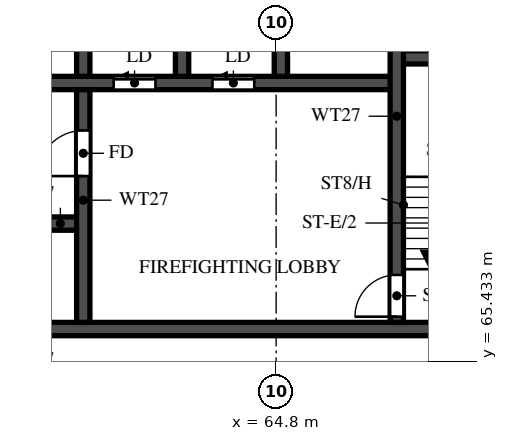
"""IFC4 building model, lengths in metres.
Left out: names, types, materials, properties, quantities, classifications, styles, units other than length and angle.
Written with IfcOpenShell. Run it as: python <this file> out.ifc"""

import sys

from ifc_helpers import new_model, si_unit, direction, frame, frame_2d, origin, place, context, subcontext, project, spatial, rectangle, extrude, element, fill, save


model = new_model("IFC4")
c1 = context("Model", 3, precision=1e-05, world=origin(), true_north=direction((0.0, 1.0)))
c2 = subcontext(c1, "Body", "Model", "MODEL_VIEW")
j1 = project(units=[si_unit("LENGTHUNIT", "METRE"), si_unit("PLANEANGLEUNIT", "RADIAN")], contexts=[c1])
p1 = place(None, origin())
s1 = spatial("IfcSite", under=j1, at=p1, CompositionType="ELEMENT")
p2 = place(p1, origin())
s2 = spatial("IfcBuilding", under=s1, at=p2, CompositionType="ELEMENT")
p3 = place(p2, frame((0.0, 0.0, 167.5)))
s3 = spatial("IfcBuildingStorey", under=s2, at=p3, CompositionType="ELEMENT", Elevation=167.5)
p4 = place(p3, frame((29.7, 66.275, 0.0), z_axis=(0.0, 0.0, 1.0), x_axis=(1.0, 0.0, 0.0)))
e1 = element("IfcWall", 1, at=p4, inside=s3, PredefinedType="SHEAR", context=c2, shape_type="SweptSolid", body=[
    extrude(rectangle(XDim=41.4, YDim=0.35, at=frame_2d((20.7, 0.0))), origin(), (0.0, 0.0, 1.0), 3.2),
])
p5 = place(p4, frame((0.925, 0.0, 0.0)))
e2 = element("IfcOpeningElement", 2, at=p5, cuts=e1, PredefinedType="OPENING", context=c2, shape_type="SweptSolid", body=[
    extrude(rectangle(XDim=1.1, YDim=2.1, at=frame_2d((0.55, 1.05))), frame((0.0, 0.185, 0.0), z_axis=(0.0, -1.0, 0.0), x_axis=(1.0, 0.0, 0.0)), (0.0, 0.0, 1.0), 0.37),
])
p6 = place(p4, frame((3.712, 0.0, 0.0)))
e3 = element("IfcOpeningElement", 3, at=p6, cuts=e1, PredefinedType="OPENING", context=c2, shape_type="SweptSolid", body=[
    extrude(rectangle(XDim=1.8, YDim=2.1, at=frame_2d((0.9, 1.05))), frame((0.0, 0.185, 0.0), z_axis=(0.0, -1.0, 0.0), x_axis=(1.0, 0.0, 0.0)), (0.0, 0.0, 1.0), 0.37),
])
p7 = place(p3, frame((35.625, 69.05, 0.0), z_axis=(0.0, 0.0, 1.0), x_axis=(1.0, 0.0, 0.0)))
e4 = element("IfcWall", 4, at=p7, inside=s3, PredefinedType="SHEAR", context=c2, shape_type="SweptSolid", body=[
    extrude(rectangle(XDim=24.1, YDim=0.35, at=frame_2d((12.05, 0.0))), origin(), (0.0, 0.0, 1.0), 3.2),
])
p8 = place(p7, frame((1.0, 0.0, 0.0)))
e5 = element("IfcOpeningElement", 5, at=p8, cuts=e4, PredefinedType="OPENING", context=c2, shape_type="SweptSolid", body=[
    extrude(rectangle(XDim=1.1, YDim=2.1, at=frame_2d((0.55, 1.05))), frame((0.0, 0.185, 0.0), z_axis=(0.0, -1.0, 0.0), x_axis=(1.0, 0.0, 0.0)), (0.0, 0.0, 1.0), 0.37),
])
p9 = place(p7, frame((3.75, 0.0, 0.0)))
e6 = element("IfcOpeningElement", 6, at=p9, cuts=e4, PredefinedType="OPENING", context=c2, shape_type="SweptSolid", body=[
    extrude(rectangle(XDim=1.1, YDim=2.1, at=frame_2d((0.55, 1.05))), frame((0.0, 0.185, 0.0), z_axis=(0.0, -1.0, 0.0), x_axis=(1.0, 0.0, 0.0)), (0.0, 0.0, 1.0), 0.37),
])
p10 = place(p7, frame((6.5, 0.0, 0.0)))
e7 = element("IfcOpeningElement", 7, at=p10, cuts=e4, PredefinedType="OPENING", context=c2, shape_type="SweptSolid", body=[
    extrude(rectangle(XDim=1.1, YDim=2.1, at=frame_2d((0.55, 1.05))), frame((0.0, 0.185, 0.0), z_axis=(0.0, -1.0, 0.0), x_axis=(1.0, 0.0, 0.0)), (0.0, 0.0, 1.0), 0.37),
])
p11 = place(p7, frame((9.25, 0.0, 0.0)))
e8 = element("IfcOpeningElement", 8, at=p11, cuts=e4, PredefinedType="OPENING", context=c2, shape_type="SweptSolid", body=[
    extrude(rectangle(XDim=1.1, YDim=2.1, at=frame_2d((0.55, 1.05))), frame((0.0, 0.185, 0.0), z_axis=(0.0, -1.0, 0.0), x_axis=(1.0, 0.0, 0.0)), (0.0, 0.0, 1.0), 0.37),
])
p12 = place(p7, frame((12.0, 0.0, 0.0)))
e9 = element("IfcOpeningElement", 9, at=p12, cuts=e4, PredefinedType="OPENING", context=c2, shape_type="SweptSolid", body=[
    extrude(rectangle(XDim=1.1, YDim=2.1, at=frame_2d((0.55, 1.05))), frame((0.0, 0.185, 0.0), z_axis=(0.0, -1.0, 0.0), x_axis=(1.0, 0.0, 0.0)), (0.0, 0.0, 1.0), 0.37),
])
p13 = place(p7, frame((14.75, 0.0, 0.0)))
e10 = element("IfcOpeningElement", 10, at=p13, cuts=e4, PredefinedType="OPENING", context=c2, shape_type="SweptSolid", body=[
    extrude(rectangle(XDim=1.1, YDim=2.1, at=frame_2d((0.55, 1.05))), frame((0.0, 0.185, 0.0), z_axis=(0.0, -1.0, 0.0), x_axis=(1.0, 0.0, 0.0)), (0.0, 0.0, 1.0), 0.37),
])
p14 = place(p7, frame((17.625, 0.0, 0.0)))
e11 = element("IfcOpeningElement", 11, at=p14, cuts=e4, PredefinedType="OPENING", context=c2, shape_type="SweptSolid", body=[
    extrude(rectangle(XDim=1.1, YDim=2.1, at=frame_2d((0.55, 1.05))), frame((0.0, 0.185, 0.0), z_axis=(0.0, -1.0, 0.0), x_axis=(1.0, 0.0, 0.0)), (0.0, 0.0, 1.0), 0.37),
])
p15 = place(p7, frame((20.625, 0.0, 0.0)))
e12 = element("IfcOpeningElement", 12, at=p15, cuts=e4, PredefinedType="OPENING", context=c2, shape_type="SweptSolid", body=[
    extrude(rectangle(XDim=1.1, YDim=2.1, at=frame_2d((0.55, 1.05))), frame((0.0, 0.185, 0.0), z_axis=(0.0, -1.0, 0.0), x_axis=(1.0, 0.0, 0.0)), (0.0, 0.0, 1.0), 0.37),
])
p16 = place(p3, frame((32.825, 72.75, 0.0), z_axis=(0.0, 0.0, 1.0), x_axis=(1.0, 0.0, 0.0)))
e13 = element("IfcWall", 13, at=p16, inside=s3, PredefinedType="SHEAR", context=c2, shape_type="SweptSolid", body=[
    extrude(rectangle(XDim=35.15, YDim=0.35, at=frame_2d((17.575, 0.0))), origin(), (0.0, 0.0, 1.0), 3.2),
])
p17 = place(p16, frame((19.8, 0.0, 0.0)))
e14 = element("IfcOpeningElement", 14, at=p17, cuts=e13, PredefinedType="OPENING", context=c2, shape_type="SweptSolid", body=[
    extrude(rectangle(XDim=1.1, YDim=2.1, at=frame_2d((0.55, 1.05))), frame((0.0, 0.185, 0.0), z_axis=(0.0, -1.0, 0.0), x_axis=(1.0, 0.0, 0.0)), (0.0, 0.0, 1.0), 0.37),
])
p18 = place(p16, frame((27.7, 0.0, 0.0)))
e15 = element("IfcOpeningElement", 15, at=p18, cuts=e13, PredefinedType="OPENING", context=c2, shape_type="SweptSolid", body=[
    extrude(rectangle(XDim=1.1, YDim=2.1, at=frame_2d((0.55, 1.05))), frame((0.0, 0.185, 0.0), z_axis=(0.0, -1.0, 0.0), x_axis=(1.0, 0.0, 0.0)), (0.0, 0.0, 1.0), 0.37),
])
p19 = place(p16, frame((30.3, 0.0, 0.0)))
e16 = element("IfcOpeningElement", 16, at=p19, cuts=e13, PredefinedType="OPENING", context=c2, shape_type="SweptSolid", body=[
    extrude(rectangle(XDim=1.1, YDim=2.1, at=frame_2d((0.55, 1.05))), frame((0.0, 0.185, 0.0), z_axis=(0.0, -1.0, 0.0), x_axis=(1.0, 0.0, 0.0)), (0.0, 0.0, 1.0), 0.37),
])
p20 = place(p16, frame((3.8, 0.0, 0.0)))
e17 = element("IfcOpeningElement", 17, at=p20, cuts=e13, PredefinedType="OPENING", context=c2, shape_type="SweptSolid", body=[
    extrude(rectangle(XDim=1.1, YDim=2.1, at=frame_2d((0.55, 1.05))), frame((0.0, 0.185, 0.0), z_axis=(0.0, -1.0, 0.0), x_axis=(1.0, 0.0, 0.0)), (0.0, 0.0, 1.0), 0.37),
])
p21 = place(p16, frame((6.55, 0.0, 0.0)))
e18 = element("IfcOpeningElement", 18, at=p21, cuts=e13, PredefinedType="OPENING", context=c2, shape_type="SweptSolid", body=[
    extrude(rectangle(XDim=1.1, YDim=2.1, at=frame_2d((0.55, 1.05))), frame((0.0, 0.185, 0.0), z_axis=(0.0, -1.0, 0.0), x_axis=(1.0, 0.0, 0.0)), (0.0, 0.0, 1.0), 0.37),
])
p22 = place(p16, frame((9.3, 0.0, 0.0)))
e19 = element("IfcOpeningElement", 19, at=p22, cuts=e13, PredefinedType="OPENING", context=c2, shape_type="SweptSolid", body=[
    extrude(rectangle(XDim=1.1, YDim=2.1, at=frame_2d((0.55, 1.05))), frame((0.0, 0.185, 0.0), z_axis=(0.0, -1.0, 0.0), x_axis=(1.0, 0.0, 0.0)), (0.0, 0.0, 1.0), 0.37),
])
p23 = place(p16, frame((12.05, 0.0, 0.0)))
e20 = element("IfcOpeningElement", 20, at=p23, cuts=e13, PredefinedType="OPENING", context=c2, shape_type="SweptSolid", body=[
    extrude(rectangle(XDim=1.1, YDim=2.1, at=frame_2d((0.55, 1.05))), frame((0.0, 0.185, 0.0), z_axis=(0.0, -1.0, 0.0), x_axis=(1.0, 0.0, 0.0)), (0.0, 0.0, 1.0), 0.37),
])
p24 = place(p16, frame((14.8, 0.0, 0.0)))
e21 = element("IfcOpeningElement", 21, at=p24, cuts=e13, PredefinedType="OPENING", context=c2, shape_type="SweptSolid", body=[
    extrude(rectangle(XDim=1.1, YDim=2.1, at=frame_2d((0.55, 1.05))), frame((0.0, 0.185, 0.0), z_axis=(0.0, -1.0, 0.0), x_axis=(1.0, 0.0, 0.0)), (0.0, 0.0, 1.0), 0.37),
])
p25 = place(p16, frame((17.55, 0.0, 0.0)))
e22 = element("IfcOpeningElement", 22, at=p25, cuts=e13, PredefinedType="OPENING", context=c2, shape_type="SweptSolid", body=[
    extrude(rectangle(XDim=1.1, YDim=2.1, at=frame_2d((0.55, 1.05))), frame((0.0, 0.185, 0.0), z_axis=(0.0, -1.0, 0.0), x_axis=(1.0, 0.0, 0.0)), (0.0, 0.0, 1.0), 0.37),
])
p26 = place(p16, frame((0.938, 0.0, 0.0)))
e23 = element("IfcOpeningElement", 23, at=p26, cuts=e13, PredefinedType="OPENING", context=c2, shape_type="SweptSolid", body=[
    extrude(rectangle(XDim=1.1, YDim=2.1, at=frame_2d((0.55, 1.05))), frame((0.0, 0.185, 0.0), z_axis=(0.0, -1.0, 0.0), x_axis=(1.0, 0.0, 0.0)), (0.0, 0.0, 1.0), 0.37),
])
p27 = place(p3, frame((67.975, 73.425, 0.0), z_axis=(0.0, 0.0, 1.0), x_axis=(1.0, 0.0, 0.0)))
e24 = element("IfcWall", 24, at=p27, inside=s3, PredefinedType="SHEAR", context=c2, shape_type="SweptSolid", body=[
    extrude(rectangle(XDim=3.125, YDim=0.35, at=frame_2d((1.562, 0.0))), origin(), (0.0, 0.0, 1.0), 3.2),
])
p28 = place(p3, frame((67.975, 66.45, 0.0), z_axis=(0.0, 0.0, 1.0), x_axis=(0.0, 1.0, 0.0)))
e25 = element("IfcWall", 25, at=p28, inside=s3, PredefinedType="SHEAR", context=c2, shape_type="SweptSolid", body=[
    extrude(rectangle(XDim=10.85, YDim=0.35, at=frame_2d((5.425, 0.0))), origin(), (0.0, 0.0, 1.0), 3.2),
])
p29 = place(p28, frame((0.15, 0.0, 0.0)))
e26 = element("IfcOpeningElement", 26, at=p29, cuts=e25, PredefinedType="OPENING", context=c2, shape_type="SweptSolid", body=[
    extrude(rectangle(XDim=1.1, YDim=2.1, at=frame_2d((0.55, 1.05))), frame((0.0, 0.185, 0.0), z_axis=(0.0, -1.0, 0.0), x_axis=(1.0, 0.0, 0.0)), (0.0, 0.0, 1.0), 0.37),
])
p30 = place(p3, frame((59.725, 66.45, 0.0), z_axis=(0.0, 0.0, 1.0), x_axis=(0.0, 1.0, 0.0)))
e27 = element("IfcWall", 27, at=p30, inside=s3, PredefinedType="SHEAR", context=c2, shape_type="SweptSolid", body=[
    extrude(rectangle(XDim=6.125, YDim=0.35, at=frame_2d((3.062, 0.0))), origin(), (0.0, 0.0, 1.0), 3.2),
])
p31 = place(p30, frame((3.85, 0.0, 0.0)))
e28 = element("IfcOpeningElement", 28, at=p31, cuts=e27, PredefinedType="OPENING", context=c2, shape_type="SweptSolid", body=[
    extrude(rectangle(XDim=1.2, YDim=2.1, at=frame_2d((0.6, 1.05))), frame((0.0, 0.185, 0.0), z_axis=(0.0, -1.0, 0.0), x_axis=(1.0, 0.0, 0.0)), (0.0, 0.0, 1.0), 0.37),
])
for number, where, z_axis, x_axis in (
    (29, (59.725, 72.925, 0.0), (0.0, 0.0, 1.0), (0.0, 1.0, 0.0)),
    (30, (62.325, 72.925, 0.0), (0.0, 0.0, 1.0), (0.0, 1.0, 0.0)),
    (31, (64.925, 72.925, 0.0), (0.0, 0.0, 1.0), (0.0, 1.0, 0.0)),
):
    element("IfcWall", number, at=place(p3, frame(where, z_axis=z_axis, x_axis=x_axis)), inside=s3, PredefinedType="SHEAR", context=c2, shape_type="SweptSolid", body=[
        extrude(rectangle(XDim=2.95, YDim=0.35, at=frame_2d((1.475, 0.0))), origin(), (0.0, 0.0, 1.0), 3.2),
    ])
p32 = place(p29, origin())
e32 = element("IfcDoor", 32, at=p32, inside=s3, OperationType="SINGLE_SWING_LEFT", PredefinedType="DOOR", context=c2, shape_type="SweptSolid", body=[
    extrude(rectangle(XDim=1.1, YDim=2.1, at=frame_2d((0.55, 1.05))), frame((0.0, 0.025, 0.0), z_axis=(0.0, -1.0, 0.0), x_axis=(1.0, 0.0, 0.0)), (0.0, 0.0, 1.0), 0.05),
])
fill(e26, e32)
p33 = place(p31, origin())
e33 = element("IfcDoor", 33, at=p33, inside=s3, OperationType="SINGLE_SWING_LEFT", PredefinedType="DOOR", context=c2, shape_type="SweptSolid", body=[
    extrude(rectangle(XDim=1.2, YDim=2.1, at=frame_2d((0.6, 1.05))), frame((0.0, 0.025, 0.0), z_axis=(0.0, -1.0, 0.0), x_axis=(1.0, 0.0, 0.0)), (0.0, 0.0, 1.0), 0.05),
])
fill(e28, e33)
p34 = place(p18, origin())
e34 = element("IfcDoor", 34, at=p34, inside=s3, OperationType="SLIDING_TO_LEFT", PredefinedType="DOOR", context=c2, shape_type="SweptSolid", body=[
    extrude(rectangle(XDim=1.1, YDim=2.1, at=frame_2d((0.55, 1.05))), frame((0.0, 0.025, 0.0), z_axis=(0.0, -1.0, 0.0), x_axis=(1.0, 0.0, 0.0)), (0.0, 0.0, 1.0), 0.05),
])
fill(e15, e34)
p35 = place(p19, origin())
e35 = element("IfcDoor", 35, at=p35, inside=s3, OperationType="SLIDING_TO_LEFT", PredefinedType="DOOR", context=c2, shape_type="SweptSolid", body=[
    extrude(rectangle(XDim=1.1, YDim=2.1, at=frame_2d((0.55, 1.05))), frame((0.0, 0.025, 0.0), z_axis=(0.0, -1.0, 0.0), x_axis=(1.0, 0.0, 0.0)), (0.0, 0.0, 1.0), 0.05),
])
fill(e16, e35)
save(model, sys.argv[1])
